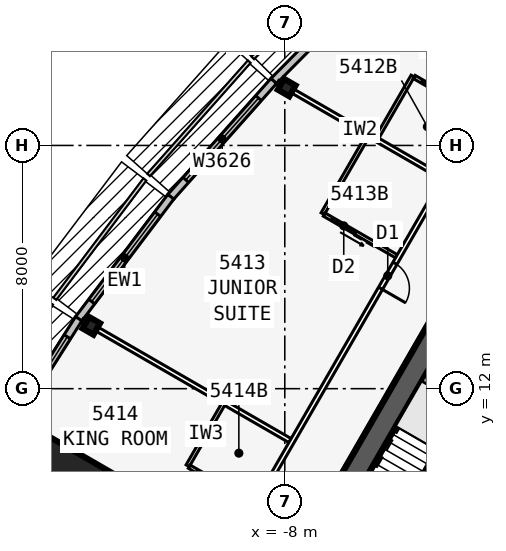
"""IFC4 building model, lengths in metres.
Left out: names, types, materials, properties, quantities, classifications, styles, units other than length and angle.
Written with IfcOpenShell. Run it as: python <this file> out.ifc"""

import sys

from ifc_helpers import new_model, si_unit, direction, frame, frame_2d, origin, origin_2d, place, context, subcontext, project, spatial, rectangle, i_section, extrude, element, fill, save


model = new_model("IFC4")
c1 = context("Model", 3, precision=1e-05, world=origin(), true_north=direction((0.0, 1.0)))
c2 = subcontext(c1, "Body", "Model", "MODEL_VIEW")
j1 = project(units=[si_unit("LENGTHUNIT", "METRE"), si_unit("PLANEANGLEUNIT", "RADIAN")], contexts=[c1])
p1 = place(None, origin())
s1 = spatial("IfcSite", under=j1, at=p1, CompositionType="ELEMENT")
p2 = place(p1, origin())
s2 = spatial("IfcBuilding", under=s1, at=p2, CompositionType="ELEMENT")
p3 = place(p2, frame((0.0, 0.0, 204.5)))
s3 = spatial("IfcBuildingStorey", under=s2, at=p3, CompositionType="ELEMENT", Elevation=204.5)
p4 = place(p3, frame((0.0, 19.052, 0.0), z_axis=(0.0, 0.0, 1.0), x_axis=(-0.499999749417, -0.866025548458, 0.0)))
e1 = element("IfcWall", 1, at=p4, inside=s3, PredefinedType="SHEAR", context=c2, shape_type="SweptSolid", body=[
    extrude(rectangle(XDim=33.0, YDim=0.75, at=frame_2d((16.5, 0.0))), origin(), (0.0, 0.0, 1.0), 3.6),
])
p5 = place(p4, frame((14.15, 0.0, 0.0)))
e2 = element("IfcOpeningElement", 2, at=p5, cuts=e1, PredefinedType="OPENING", context=c2, shape_type="SweptSolid", body=[
    extrude(rectangle(XDim=1.8, YDim=2.13, at=frame_2d((0.9, 1.065))), frame((0.0, 0.385, 0.0), z_axis=(0.0, -1.0, 0.0), x_axis=(1.0, 0.0, 0.0)), (0.0, 0.0, 1.0), 0.77),
])
p6 = place(p4, frame((12.6, 0.0, 0.0)))
e3 = element("IfcOpeningElement", 3, at=p6, cuts=e1, PredefinedType="OPENING", context=c2, shape_type="SweptSolid", body=[
    extrude(rectangle(XDim=1.0, YDim=2.13, at=frame_2d((0.5, 1.065))), frame((0.0, 0.385, 0.0), z_axis=(0.0, -1.0, 0.0), x_axis=(1.0, 0.0, 0.0)), (0.0, 0.0, 1.0), 0.77),
])
p7 = place(p3, frame((-0.062, 11.794, 0.0), z_axis=(0.0, 0.0, 1.0), x_axis=(-0.500006680225, -0.86602154692, 0.0)))
e4 = element("IfcWall", 4, at=p7, inside=s3, PredefinedType="SOLIDWALL", context=c2, shape_type="SweptSolid", body=[
    extrude(rectangle(XDim=7.733, YDim=0.25, at=frame_2d((3.866, 0.0))), origin(), (0.0, 0.0, 1.0), 3.435),
])
p8 = place(p3, frame((-0.679, 10.727, 0.0), z_axis=(0.0, 0.0, 1.0), x_axis=(-0.866008981251, 0.500028443584, 0.0)))
e5 = element("IfcWall", 5, at=p8, inside=s3, PredefinedType="SOLIDWALL", context=c2, shape_type="SweptSolid", body=[
    extrude(rectangle(XDim=3.2, YDim=0.2, at=frame_2d((1.6, 0.0))), origin(), (0.0, 0.0, 1.0), 3.435),
])
for number, where, z_axis, x_axis in (
    (6, (-7.937, 21.903, 0.0), (0.0, 0.0, 1.0), (-0.5, -0.866, 0.0)),
    (7, (-14.363, 14.066, 0.0), (0.0, 0.0, 1.0), (-0.866, 0.5, 0.0)),
):
    element("IfcColumn", number, at=place(p3, frame(where, z_axis=z_axis, x_axis=x_axis)), inside=s3, PredefinedType="COLUMN", context=c2, shape_type="SweptSolid", body=[
        extrude(i_section(OverallWidth=0.411, OverallDepth=0.434, WebThickness=0.036, FlangeThickness=0.057, at=origin_2d()), origin(), (0.0, 0.0, 1.0), 3.6),
    ])
p9 = place(p3, frame((-15.312, 8.84, 0.0), z_axis=(0.0, 0.0, 1.0), x_axis=(-0.866025403784, 0.5, 0.0)))
e8 = element("IfcColumn", 8, at=p9, inside=s3, PredefinedType="COLUMN", context=c2, shape_type="SweptSolid", body=[
    extrude(rectangle(XDim=2.3, YDim=2.3, at=origin_2d()), origin(), (0.0, 0.0, 1.0), 3.6),
])
p10 = place(p3, frame((-6.911, 23.583, 0.0), z_axis=(0.0, 0.0, 1.0), x_axis=(-0.704149946111, -0.710051303352, 0.0)))
e9 = element("IfcWall", 9, at=p10, inside=s3, PredefinedType="STANDARD", context=c2, shape_type="SweptSolid", body=[
    extrude(rectangle(XDim=2.069, YDim=0.25, at=frame_2d((1.034, 0.0))), origin(), (0.0, 0.0, 1.0), 3.435),
])
p11 = place(p3, frame((-8.363, 22.12, 0.0), z_axis=(0.0, 0.0, 1.0), x_axis=(-0.664348996191, -0.747422511876, 0.0)))
e10 = element("IfcWall", 10, at=p11, inside=s3, PredefinedType="STANDARD", context=c2, shape_type="SweptSolid", body=[
    extrude(rectangle(XDim=5.105, YDim=0.25, at=frame_2d((2.552, 0.0))), origin(), (0.0, 0.0, 1.0), 3.435),
])
p12 = place(p11, frame((0.752, 0.0, 0.45)))
e11 = element("IfcOpeningElement", 11, at=p12, cuts=e10, PredefinedType="OPENING", context=c2, shape_type="SweptSolid", body=[
    extrude(rectangle(XDim=3.6, YDim=2.6, at=frame_2d((1.8, 1.3))), frame((0.0, 0.135, 0.0), z_axis=(0.0, -1.0, 0.0), x_axis=(1.0, 0.0, 0.0)), (0.0, 0.0, 1.0), 0.27),
])
p13 = place(p3, frame((-11.748, 18.312, 0.0), z_axis=(0.0, 0.0, 1.0), x_axis=(-0.602408653511, -0.798187831388, 0.0)))
e12 = element("IfcWall", 12, at=p13, inside=s3, PredefinedType="STANDARD", context=c2, shape_type="SweptSolid", body=[
    extrude(rectangle(XDim=5.038, YDim=0.25, at=frame_2d((2.519, 0.0))), origin(), (0.0, 0.0, 1.0), 3.435),
])
p14 = place(p13, frame((0.719, 0.0, 0.45)))
e13 = element("IfcOpeningElement", 13, at=p14, cuts=e12, PredefinedType="OPENING", context=c2, shape_type="SweptSolid", body=[
    extrude(rectangle(XDim=3.6, YDim=2.6, at=frame_2d((1.8, 1.3))), frame((0.0, 0.135, 0.0), z_axis=(0.0, -1.0, 0.0), x_axis=(1.0, 0.0, 0.0)), (0.0, 0.0, 1.0), 0.27),
])
p15 = place(p3, frame((-14.777, 14.299, 0.0), z_axis=(0.0, 0.0, 1.0), x_axis=(-0.535220361449, -0.844712474568, 0.0)))
e14 = element("IfcWall", 14, at=p15, inside=s3, PredefinedType="STANDARD", context=c2, shape_type="SweptSolid", body=[
    extrude(rectangle(XDim=5.004, YDim=0.25, at=frame_2d((2.502, 0.0))), origin(), (0.0, 0.0, 1.0), 3.435),
])
p16 = place(p15, frame((0.702, 0.0, 0.45)))
e15 = element("IfcOpeningElement", 15, at=p16, cuts=e14, PredefinedType="OPENING", context=c2, shape_type="SweptSolid", body=[
    extrude(rectangle(XDim=3.6, YDim=2.6, at=frame_2d((1.8, 1.3))), frame((0.0, 0.135, 0.0), z_axis=(0.0, -1.0, 0.0), x_axis=(1.0, 0.0, 0.0)), (0.0, 0.0, 1.0), 0.27),
])
p17 = place(p3, frame((-0.425, 22.966, 0.0), z_axis=(0.0, 0.0, 1.0), x_axis=(-0.500000265775, -0.866025250339, 0.0)))
e16 = element("IfcWall", 16, at=p17, inside=s3, PredefinedType="PARTITIONING", context=c2, shape_type="SweptSolid", body=[
    extrude(rectangle(XDim=39.354, YDim=0.15, at=frame_2d((19.677, 0.0))), origin(), (0.0, 0.0, 1.0), 3.435),
])
p18 = place(p17, frame((1.102, 0.0, 0.0)))
e17 = element("IfcOpeningElement", 17, at=p18, cuts=e16, PredefinedType="OPENING", context=c2, shape_type="SweptSolid", body=[
    extrude(rectangle(XDim=0.95, YDim=2.13, at=frame_2d((0.475, 1.065))), frame((0.0, 0.085, 0.0), z_axis=(0.0, -1.0, 0.0), x_axis=(1.0, 0.0, 0.0)), (0.0, 0.0, 1.0), 0.17),
])
p19 = place(p17, frame((7.902, 0.0, 0.0)))
e18 = element("IfcOpeningElement", 18, at=p19, cuts=e16, PredefinedType="OPENING", context=c2, shape_type="SweptSolid", body=[
    extrude(rectangle(XDim=0.95, YDim=2.13, at=frame_2d((0.475, 1.065))), frame((0.0, 0.085, 0.0), z_axis=(0.0, -1.0, 0.0), x_axis=(1.0, 0.0, 0.0)), (0.0, 0.0, 1.0), 0.17),
])
p20 = place(p17, frame((17.302, 0.0, 0.0)))
e19 = element("IfcOpeningElement", 19, at=p20, cuts=e16, PredefinedType="OPENING", context=c2, shape_type="SweptSolid", body=[
    extrude(rectangle(XDim=0.95, YDim=2.13, at=frame_2d((0.475, 1.065))), frame((0.0, 0.085, 0.0), z_axis=(0.0, -1.0, 0.0), x_axis=(1.0, 0.0, 0.0)), (0.0, 0.0, 1.0), 0.17),
])
p21 = place(p17, frame((26.702, 0.0, 0.0)))
e20 = element("IfcOpeningElement", 20, at=p21, cuts=e16, PredefinedType="OPENING", context=c2, shape_type="SweptSolid", body=[
    extrude(rectangle(XDim=0.95, YDim=2.13, at=frame_2d((0.475, 1.065))), frame((0.0, 0.085, 0.0), z_axis=(0.0, -1.0, 0.0), x_axis=(1.0, 0.0, 0.0)), (0.0, 0.0, 1.0), 0.17),
])
p22 = place(p17, frame((37.302, 0.0, 0.0)))
e21 = element("IfcOpeningElement", 21, at=p22, cuts=e16, PredefinedType="OPENING", context=c2, shape_type="SweptSolid", body=[
    extrude(rectangle(XDim=0.95, YDim=2.13, at=frame_2d((0.475, 1.065))), frame((0.0, 0.085, 0.0), z_axis=(0.0, -1.0, 0.0), x_axis=(1.0, 0.0, 0.0)), (0.0, 0.0, 1.0), 0.17),
])
p23 = place(p3, frame((-2.829, 18.954, 0.0), z_axis=(0.0, 0.0, 1.0), x_axis=(-0.866026604282, 0.499997920671, 0.0)))
e22 = element("IfcWall", 22, at=p23, inside=s3, PredefinedType="PARTITIONING", context=c2, shape_type="SweptSolid", body=[
    extrude(rectangle(XDim=6.24, YDim=0.15, at=frame_2d((3.12, 0.0))), origin(), (0.0, 0.0, 1.0), 2.589),
])
p24 = place(p3, frame((-7.829, 10.293, 0.0), z_axis=(0.0, 0.0, 1.0), x_axis=(-0.866030558329, 0.49999107196, 0.0)))
e23 = element("IfcWall", 23, at=p24, inside=s3, PredefinedType="PARTITIONING", context=c2, shape_type="SweptSolid", body=[
    extrude(rectangle(XDim=7.894, YDim=0.15, at=frame_2d((3.947, 0.0))), origin(), (0.0, 0.0, 1.0), 2.589),
])
p25 = place(p3, frame((-10.329, 5.963, 0.0), z_axis=(0.0, 0.0, 1.0), x_axis=(-0.866016460812, 0.500015489362, 0.0)))
e24 = element("IfcWall", 24, at=p25, inside=s3, PredefinedType="PARTITIONING", context=c2, shape_type="SweptSolid", body=[
    extrude(rectangle(XDim=8.101, YDim=0.15, at=frame_2d((4.051, 0.0))), origin(), (0.0, 0.0, 1.0), 2.589),
])
p26 = place(p3, frame((-3.793, 22.282, 0.0), z_axis=(0.0, 0.0, 1.0), x_axis=(-0.500001309137, -0.866024647952, 0.0)))
e25 = element("IfcWall", 25, at=p26, inside=s3, PredefinedType="PLUMBINGWALL", context=c2, shape_type="SweptSolid", body=[
    extrude(rectangle(XDim=2.4, YDim=0.12, at=frame_2d((1.2, 0.0))), origin(), (0.0, 0.0, 1.0), 3.435),
])
p27 = place(p3, frame((-1.628, 21.032, 0.0), z_axis=(0.0, 0.0, 1.0), x_axis=(-0.866048967903, 0.499959183527, 0.0)))
e26 = element("IfcWall", 26, at=p27, inside=s3, PredefinedType="PLUMBINGWALL", context=c2, shape_type="SweptSolid", body=[
    extrude(rectangle(XDim=2.44, YDim=0.12, at=frame_2d((1.22, 0.0))), origin(), (0.0, 0.0, 1.0), 3.435),
])
p28 = place(p27, frame((1.25, 0.0, 0.0)))
e27 = element("IfcOpeningElement", 27, at=p28, cuts=e26, PredefinedType="OPENING", context=c2, shape_type="SweptSolid", body=[
    extrude(rectangle(XDim=0.9, YDim=2.13, at=frame_2d((0.45, 1.065))), frame((0.0, 0.07, 0.0), z_axis=(0.0, -1.0, 0.0), x_axis=(1.0, 0.0, 0.0)), (0.0, 0.0, 1.0), 0.14),
])
p29 = place(p3, frame((-5.253, 20.354, 0.0), z_axis=(0.0, 0.0, 1.0), x_axis=(-0.499990139034, -0.866031096941, 0.0)))
e28 = element("IfcWall", 28, at=p29, inside=s3, PredefinedType="PLUMBINGWALL", context=c2, shape_type="SweptSolid", body=[
    extrude(rectangle(XDim=3.0, YDim=0.12, at=frame_2d((1.5, 0.0))), origin(), (0.0, 0.0, 1.0), 3.435),
])
p30 = place(p3, frame((-4.329, 16.355, 0.0), z_axis=(0.0, 0.0, 1.0), x_axis=(-0.866035715982, 0.499982138324, 0.0)))
e29 = element("IfcWall", 29, at=p30, inside=s3, PredefinedType="PLUMBINGWALL", context=c2, shape_type="SweptSolid", body=[
    extrude(rectangle(XDim=2.74, YDim=0.12, at=frame_2d((1.37, 0.0))), origin(), (0.0, 0.0, 1.0), 3.435),
])
p31 = place(p30, frame((1.55, 0.0, 0.0)))
e30 = element("IfcOpeningElement", 30, at=p31, cuts=e29, PredefinedType="OPENING", context=c2, shape_type="SweptSolid", body=[
    extrude(rectangle(XDim=0.9, YDim=2.13, at=frame_2d((0.45, 1.065))), frame((0.0, 0.07, 0.0), z_axis=(0.0, -1.0, 0.0), x_axis=(1.0, 0.0, 0.0)), (0.0, 0.0, 1.0), 0.14),
])
p32 = place(p3, frame((-9.993, 11.543, 0.0), z_axis=(0.0, 0.0, 1.0), x_axis=(-0.500077600433, -0.865980596518, 0.0)))
e31 = element("IfcWall", 31, at=p32, inside=s3, PredefinedType="PLUMBINGWALL", context=c2, shape_type="SweptSolid", body=[
    extrude(rectangle(XDim=2.4, YDim=0.12, at=frame_2d((1.2, 0.0))), origin(), (0.0, 0.0, 1.0), 3.435),
])
p33 = place(p3, frame((-9.029, 8.215, 0.0), z_axis=(0.0, 0.0, 1.0), x_axis=(-0.866023955769, 0.500002508028, 0.0)))
e32 = element("IfcWall", 32, at=p33, inside=s3, PredefinedType="PLUMBINGWALL", context=c2, shape_type="SweptSolid", body=[
    extrude(rectangle(XDim=2.44, YDim=0.12, at=frame_2d((1.22, 0.0))), origin(), (0.0, 0.0, 1.0), 3.435),
])
p34 = place(p33, frame((1.25, 0.0, 0.0)))
e33 = element("IfcOpeningElement", 33, at=p34, cuts=e32, PredefinedType="OPENING", context=c2, shape_type="SweptSolid", body=[
    extrude(rectangle(XDim=0.9, YDim=2.13, at=frame_2d((0.45, 1.065))), frame((0.0, 0.07, 0.0), z_axis=(0.0, -1.0, 0.0), x_axis=(1.0, 0.0, 0.0)), (0.0, 0.0, 1.0), 0.14),
])
p35 = place(p3, frame((-2.988, 9.978, 0.0), z_axis=(0.0, 0.0, 1.0), x_axis=(-0.499992232847, -0.866029888106, 0.0)))
e34 = element("IfcWall", 34, at=p35, inside=s3, PredefinedType="SOLIDWALL", context=c2, shape_type="SweptSolid", body=[
    extrude(rectangle(XDim=2.794, YDim=0.1, at=frame_2d((1.397, 0.0))), origin(), (0.0, 0.0, 1.0), 3.6),
])
p36 = place(p12, origin())
e35 = element("IfcWindow", 35, at=p36, inside=s3, PartitioningType="SINGLE_PANEL", PredefinedType="WINDOW", context=c2, shape_type="SweptSolid", body=[
    extrude(rectangle(XDim=3.6, YDim=2.6, at=frame_2d((1.8, 1.3))), frame((0.0, 0.03, 0.0), z_axis=(0.0, -1.0, 0.0), x_axis=(1.0, 0.0, 0.0)), (0.0, 0.0, 1.0), 0.06),
])
fill(e11, e35)
p37 = place(p14, origin())
e36 = element("IfcWindow", 36, at=p37, inside=s3, PartitioningType="SINGLE_PANEL", PredefinedType="WINDOW", context=c2, shape_type="SweptSolid", body=[
    extrude(rectangle(XDim=3.6, YDim=2.6, at=frame_2d((1.8, 1.3))), frame((0.0, 0.03, 0.0), z_axis=(0.0, -1.0, 0.0), x_axis=(1.0, 0.0, 0.0)), (0.0, 0.0, 1.0), 0.06),
])
fill(e13, e36)
p38 = place(p16, origin())
e37 = element("IfcWindow", 37, at=p38, inside=s3, PartitioningType="SINGLE_PANEL", PredefinedType="WINDOW", context=c2, shape_type="SweptSolid", body=[
    extrude(rectangle(XDim=3.6, YDim=2.6, at=frame_2d((1.8, 1.3))), frame((0.0, 0.03, 0.0), z_axis=(0.0, -1.0, 0.0), x_axis=(1.0, 0.0, 0.0)), (0.0, 0.0, 1.0), 0.06),
])
fill(e15, e37)
p39 = place(p28, origin())
e38 = element("IfcDoor", 38, at=p39, inside=s3, OperationType="SLIDING_TO_LEFT", PredefinedType="DOOR", context=c2, shape_type="SweptSolid", body=[
    extrude(rectangle(XDim=0.9, YDim=2.13, at=frame_2d((0.45, 1.065))), frame((0.0, 0.025, 0.0), z_axis=(0.0, -1.0, 0.0), x_axis=(1.0, 0.0, 0.0)), (0.0, 0.0, 1.0), 0.05),
])
fill(e27, e38)
p40 = place(p31, origin())
e39 = element("IfcDoor", 39, at=p40, inside=s3, OperationType="SLIDING_TO_LEFT", PredefinedType="DOOR", context=c2, shape_type="SweptSolid", body=[
    extrude(rectangle(XDim=0.9, YDim=2.13, at=frame_2d((0.45, 1.065))), frame((0.0, 0.025, 0.0), z_axis=(0.0, -1.0, 0.0), x_axis=(1.0, 0.0, 0.0)), (0.0, 0.0, 1.0), 0.05),
])
fill(e30, e39)
p41 = place(p19, origin())
e40 = element("IfcDoor", 40, at=p41, inside=s3, OperationType="SINGLE_SWING_RIGHT", PredefinedType="DOOR", context=c2, shape_type="SweptSolid", body=[
    extrude(rectangle(XDim=0.95, YDim=2.13, at=frame_2d((0.475, 1.065))), frame((0.0, 0.025, 0.0), z_axis=(0.0, -1.0, 0.0), x_axis=(1.0, 0.0, 0.0)), (0.0, 0.0, 1.0), 0.05),
])
fill(e18, e40)
p42 = place(p34, origin())
e41 = element("IfcDoor", 41, at=p42, inside=s3, OperationType="SLIDING_TO_LEFT", PredefinedType="DOOR", context=c2, shape_type="SweptSolid", body=[
    extrude(rectangle(XDim=0.9, YDim=2.13, at=frame_2d((0.45, 1.065))), frame((0.0, 0.025, 0.0), z_axis=(0.0, -1.0, 0.0), x_axis=(1.0, 0.0, 0.0)), (0.0, 0.0, 1.0), 0.05),
])
fill(e33, e41)
save(model, sys.argv[1])
